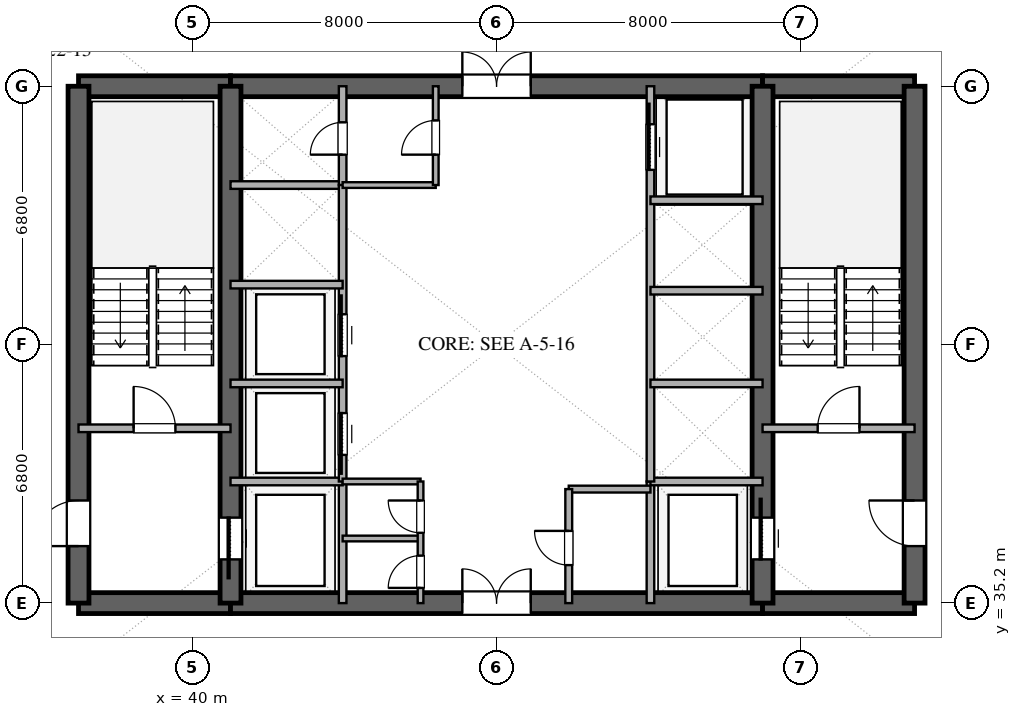
"""IFC4 building model, lengths in metres.
Left out: names, types, materials, properties, quantities, classifications, styles, units other than length and angle.
Written with IfcOpenShell. Run it as: python <this file> out.ifc"""

import sys

from ifc_helpers import new_model, si_unit, direction, frame, frame_2d, origin, place, context, subcontext, project, spatial, rectangle, extrude, element, fill, save


model = new_model("IFC4")
c1 = context("Model", 3, precision=1e-05, world=origin(), true_north=direction((0.0, 1.0)))
c2 = subcontext(c1, "Body", "Model", "MODEL_VIEW")
j1 = project(units=[si_unit("LENGTHUNIT", "METRE"), si_unit("PLANEANGLEUNIT", "RADIAN")], contexts=[c1])
p1 = place(None, origin())
s1 = spatial("IfcSite", under=j1, at=p1, CompositionType="ELEMENT")
p2 = place(p1, origin())
s2 = spatial("IfcBuilding", under=s1, at=p2, CompositionType="ELEMENT")
p3 = place(p2, frame((0.0, 0.0, 91.2)))
s3 = spatial("IfcBuildingStorey", under=s2, at=p3, CompositionType="ELEMENT", Elevation=91.2)
p4 = place(p3, frame((37.0, 35.2, 0.0), z_axis=(0.0, 0.0, 1.0), x_axis=(1.0, 0.0, 0.0)))
e1 = element("IfcWall", 1, at=p4, inside=s3, PredefinedType="SHEAR", context=c2, shape_type="SweptSolid", body=[
    extrude(rectangle(XDim=4.0, YDim=0.55, at=frame_2d((2.0, 0.0))), origin(), (0.0, 0.0, 1.0), 3.38),
])
p5 = place(p3, frame((41.0, 35.2, 0.0), z_axis=(0.0, 0.0, 1.0), x_axis=(1.0, 0.0, 0.0)))
e2 = element("IfcWall", 2, at=p5, inside=s3, PredefinedType="SHEAR", context=c2, shape_type="SweptSolid", body=[
    extrude(rectangle(XDim=14.0, YDim=0.55, at=frame_2d((7.0, 0.0))), origin(), (0.0, 0.0, 1.0), 3.38),
])
p6 = place(p5, frame((6.1, 0.0, 0.0)))
e3 = element("IfcOpeningElement", 3, at=p6, cuts=e2, PredefinedType="OPENING", context=c2, shape_type="SweptSolid", body=[
    extrude(rectangle(XDim=1.8, YDim=2.25, at=frame_2d((0.9, 1.125))), frame((0.0, 0.285, 0.0), z_axis=(0.0, -1.0, 0.0), x_axis=(1.0, 0.0, 0.0)), (0.0, 0.0, 1.0), 0.57),
])
for number, where, z_axis, x_axis in (
    (4, (55.0, 35.2, 0.0), (0.0, 0.0, 1.0), (1.0, 0.0, 0.0)),
    (5, (37.0, 48.8, 0.0), (0.0, 0.0, 1.0), (1.0, 0.0, 0.0)),
):
    element("IfcWall", number, at=place(p3, frame(where, z_axis=z_axis, x_axis=x_axis)), inside=s3, PredefinedType="SHEAR", context=c2, shape_type="SweptSolid", body=[
        extrude(rectangle(XDim=4.0, YDim=0.55, at=frame_2d((2.0, 0.0))), origin(), (0.0, 0.0, 1.0), 3.38),
    ])
p7 = place(p3, frame((41.0, 48.8, 0.0), z_axis=(0.0, 0.0, 1.0), x_axis=(1.0, 0.0, 0.0)))
e6 = element("IfcWall", 6, at=p7, inside=s3, PredefinedType="SHEAR", context=c2, shape_type="SweptSolid", body=[
    extrude(rectangle(XDim=14.0, YDim=0.55, at=frame_2d((7.0, 0.0))), origin(), (0.0, 0.0, 1.0), 3.38),
])
p8 = place(p7, frame((6.1, 0.0, 0.0)))
e7 = element("IfcOpeningElement", 7, at=p8, cuts=e6, PredefinedType="OPENING", context=c2, shape_type="SweptSolid", body=[
    extrude(rectangle(XDim=1.8, YDim=2.25, at=frame_2d((0.9, 1.125))), frame((0.0, 0.285, 0.0), z_axis=(0.0, -1.0, 0.0), x_axis=(1.0, 0.0, 0.0)), (0.0, 0.0, 1.0), 0.57),
])
p9 = place(p3, frame((55.0, 48.8, 0.0), z_axis=(0.0, 0.0, 1.0), x_axis=(1.0, 0.0, 0.0)))
e8 = element("IfcWall", 8, at=p9, inside=s3, PredefinedType="SHEAR", context=c2, shape_type="SweptSolid", body=[
    extrude(rectangle(XDim=4.0, YDim=0.55, at=frame_2d((2.0, 0.0))), origin(), (0.0, 0.0, 1.0), 3.38),
])
p10 = place(p3, frame((37.0, 35.2, 0.0), z_axis=(0.0, 0.0, 1.0), x_axis=(0.0, 1.0, 0.0)))
e9 = element("IfcWall", 9, at=p10, inside=s3, PredefinedType="SHEAR", context=c2, shape_type="SweptSolid", body=[
    extrude(rectangle(XDim=13.6, YDim=0.55, at=frame_2d((6.8, 0.0))), origin(), (0.0, 0.0, 1.0), 3.38),
])
p11 = place(p10, frame((1.5, 0.0, 0.0)))
e10 = element("IfcOpeningElement", 10, at=p11, cuts=e9, PredefinedType="OPENING", context=c2, shape_type="SweptSolid", body=[
    extrude(rectangle(XDim=1.2, YDim=2.15, at=frame_2d((0.6, 1.075))), frame((0.0, 0.285, 0.0), z_axis=(0.0, -1.0, 0.0), x_axis=(1.0, 0.0, 0.0)), (0.0, 0.0, 1.0), 0.57),
])
p12 = place(p3, frame((59.0, 35.2, 0.0), z_axis=(0.0, 0.0, 1.0), x_axis=(0.0, 1.0, 0.0)))
e11 = element("IfcWall", 11, at=p12, inside=s3, PredefinedType="SHEAR", context=c2, shape_type="SweptSolid", body=[
    extrude(rectangle(XDim=13.6, YDim=0.55, at=frame_2d((6.8, 0.0))), origin(), (0.0, 0.0, 1.0), 3.38),
])
p13 = place(p12, frame((1.5, 0.0, 0.0)))
e12 = element("IfcOpeningElement", 12, at=p13, cuts=e11, PredefinedType="OPENING", context=c2, shape_type="SweptSolid", body=[
    extrude(rectangle(XDim=1.2, YDim=2.15, at=frame_2d((0.6, 1.075))), frame((0.0, 0.285, 0.0), z_axis=(0.0, -1.0, 0.0), x_axis=(1.0, 0.0, 0.0)), (0.0, 0.0, 1.0), 0.57),
])
p14 = place(p3, frame((41.0, 35.2, 0.0), z_axis=(0.0, 0.0, 1.0), x_axis=(0.0, 1.0, 0.0)))
e13 = element("IfcWall", 13, at=p14, inside=s3, PredefinedType="SHEAR", context=c2, shape_type="SweptSolid", body=[
    extrude(rectangle(XDim=13.6, YDim=0.55, at=frame_2d((6.8, 0.0))), origin(), (0.0, 0.0, 1.0), 3.38),
])
p15 = place(p14, frame((1.15, 0.0, 0.0)))
e14 = element("IfcOpeningElement", 14, at=p15, cuts=e13, PredefinedType="OPENING", context=c2, shape_type="SweptSolid", body=[
    extrude(rectangle(XDim=1.1, YDim=2.2, at=frame_2d((0.55, 1.1))), frame((0.0, 0.285, 0.0), z_axis=(0.0, -1.0, 0.0), x_axis=(1.0, 0.0, 0.0)), (0.0, 0.0, 1.0), 0.57),
])
p16 = place(p3, frame((55.0, 35.2, 0.0), z_axis=(0.0, 0.0, 1.0), x_axis=(0.0, 1.0, 0.0)))
e15 = element("IfcWall", 15, at=p16, inside=s3, PredefinedType="SHEAR", context=c2, shape_type="SweptSolid", body=[
    extrude(rectangle(XDim=13.6, YDim=0.55, at=frame_2d((6.8, 0.0))), origin(), (0.0, 0.0, 1.0), 3.38),
])
p17 = place(p16, frame((1.15, 0.0, 0.0)))
e16 = element("IfcOpeningElement", 16, at=p17, cuts=e15, PredefinedType="OPENING", context=c2, shape_type="SweptSolid", body=[
    extrude(rectangle(XDim=1.1, YDim=2.2, at=frame_2d((0.55, 1.1))), frame((0.0, 0.285, 0.0), z_axis=(0.0, -1.0, 0.0), x_axis=(1.0, 0.0, 0.0)), (0.0, 0.0, 1.0), 0.57),
])
p18 = place(p3, frame((37.0, 39.8, 0.0), z_axis=(0.0, 0.0, 1.0), x_axis=(1.0, 0.0, 0.0)))
e17 = element("IfcWall", 17, at=p18, inside=s3, PredefinedType="SOLIDWALL", context=c2, shape_type="SweptSolid", body=[
    extrude(rectangle(XDim=4.0, YDim=0.2, at=frame_2d((2.0, 0.0))), origin(), (0.0, 0.0, 1.0), 2.74),
])
p19 = place(p18, frame((1.45, 0.0, 0.0)))
e18 = element("IfcOpeningElement", 18, at=p19, cuts=e17, PredefinedType="OPENING", context=c2, shape_type="SweptSolid", body=[
    extrude(rectangle(XDim=1.1, YDim=2.15, at=frame_2d((0.55, 1.075))), frame((0.0, 0.11, 0.0), z_axis=(0.0, -1.0, 0.0), x_axis=(1.0, 0.0, 0.0)), (0.0, 0.0, 1.0), 0.22),
])
p20 = place(p3, frame((55.0, 39.8, 0.0), z_axis=(0.0, 0.0, 1.0), x_axis=(1.0, 0.0, 0.0)))
e19 = element("IfcWall", 19, at=p20, inside=s3, PredefinedType="SOLIDWALL", context=c2, shape_type="SweptSolid", body=[
    extrude(rectangle(XDim=4.0, YDim=0.2, at=frame_2d((2.0, 0.0))), origin(), (0.0, 0.0, 1.0), 2.74),
])
p21 = place(p20, frame((1.45, 0.0, 0.0)))
e20 = element("IfcOpeningElement", 20, at=p21, cuts=e19, PredefinedType="OPENING", context=c2, shape_type="SweptSolid", body=[
    extrude(rectangle(XDim=1.1, YDim=2.15, at=frame_2d((0.55, 1.075))), frame((0.0, 0.11, 0.0), z_axis=(0.0, -1.0, 0.0), x_axis=(1.0, 0.0, 0.0)), (0.0, 0.0, 1.0), 0.22),
])
p22 = place(p3, frame((43.95, 35.2, 0.0), z_axis=(0.0, 0.0, 1.0), x_axis=(0.0, 1.0, 0.0)))
e21 = element("IfcWall", 21, at=p22, inside=s3, PredefinedType="SOLIDWALL", context=c2, shape_type="SweptSolid", body=[
    extrude(rectangle(XDim=3.2, YDim=0.2, at=frame_2d((1.6, 0.0))), origin(), (0.0, 0.0, 1.0), 2.74),
])
p23 = place(p3, frame((41.0, 38.4, 0.0), z_axis=(0.0, 0.0, 1.0), x_axis=(1.0, 0.0, 0.0)))
e22 = element("IfcWall", 22, at=p23, inside=s3, PredefinedType="SOLIDWALL", context=c2, shape_type="SweptSolid", body=[
    extrude(rectangle(XDim=2.95, YDim=0.2, at=frame_2d((1.475, 0.0))), origin(), (0.0, 0.0, 1.0), 2.74),
])
p24 = place(p3, frame((52.05, 35.2, 0.0), z_axis=(0.0, 0.0, 1.0), x_axis=(0.0, 1.0, 0.0)))
e23 = element("IfcWall", 23, at=p24, inside=s3, PredefinedType="SOLIDWALL", context=c2, shape_type="SweptSolid", body=[
    extrude(rectangle(XDim=3.2, YDim=0.2, at=frame_2d((1.6, 0.0))), origin(), (0.0, 0.0, 1.0), 2.74),
])
for number, where, z_axis, x_axis in (
    (24, (52.05, 38.4, 0.0), (0.0, 0.0, 1.0), (1.0, 0.0, 0.0)),
    (25, (41.0, 46.2, 0.0), (0.0, 0.0, 1.0), (1.0, 0.0, 0.0)),
):
    element("IfcWall", number, at=place(p3, frame(where, z_axis=z_axis, x_axis=x_axis)), inside=s3, PredefinedType="SOLIDWALL", context=c2, shape_type="SweptSolid", body=[
        extrude(rectangle(XDim=2.95, YDim=0.2, at=frame_2d((1.475, 0.0))), origin(), (0.0, 0.0, 1.0), 2.74),
    ])
p25 = place(p3, frame((43.95, 46.2, 0.0), z_axis=(0.0, 0.0, 1.0), x_axis=(0.0, 1.0, 0.0)))
e26 = element("IfcWall", 26, at=p25, inside=s3, PredefinedType="SOLIDWALL", context=c2, shape_type="SweptSolid", body=[
    extrude(rectangle(XDim=2.6, YDim=0.2, at=frame_2d((1.3, 0.0))), origin(), (0.0, 0.0, 1.0), 2.74),
])
p26 = place(p25, frame((0.8, 0.0, 0.0)))
e27 = element("IfcOpeningElement", 27, at=p26, cuts=e26, PredefinedType="OPENING", context=c2, shape_type="SweptSolid", body=[
    extrude(rectangle(XDim=0.85, YDim=2.15, at=frame_2d((0.425, 1.075))), frame((0.0, 0.11, 0.0), z_axis=(0.0, -1.0, 0.0), x_axis=(1.0, 0.0, 0.0)), (0.0, 0.0, 1.0), 0.22),
])
p27 = place(p3, frame((43.95, 38.4, 0.0), z_axis=(0.0, 0.0, 1.0), x_axis=(0.0, 1.0, 0.0)))
e28 = element("IfcWall", 28, at=p27, inside=s3, PredefinedType="SOLIDWALL", context=c2, shape_type="SweptSolid", body=[
    extrude(rectangle(XDim=7.8, YDim=0.2, at=frame_2d((3.9, 0.0))), origin(), (0.0, 0.0, 1.0), 2.74),
])
p28 = place(p27, frame((0.7, 0.0, 0.0)))
e29 = element("IfcOpeningElement", 29, at=p28, cuts=e28, PredefinedType="OPENING", context=c2, shape_type="SweptSolid", body=[
    extrude(rectangle(XDim=1.1, YDim=2.2, at=frame_2d((0.55, 1.1))), frame((0.0, 0.11, 0.0), z_axis=(0.0, -1.0, 0.0), x_axis=(1.0, 0.0, 0.0)), (0.0, 0.0, 1.0), 0.22),
])
p29 = place(p27, frame((3.3, 0.0, 0.0)))
e30 = element("IfcOpeningElement", 30, at=p29, cuts=e28, PredefinedType="OPENING", context=c2, shape_type="SweptSolid", body=[
    extrude(rectangle(XDim=1.1, YDim=2.2, at=frame_2d((0.55, 1.1))), frame((0.0, 0.11, 0.0), z_axis=(0.0, -1.0, 0.0), x_axis=(1.0, 0.0, 0.0)), (0.0, 0.0, 1.0), 0.22),
])
for number, where, z_axis, x_axis in (
    (31, (41.0, 40.98, 0.0), (0.0, 0.0, 1.0), (1.0, 0.0, 0.0)),
    (32, (41.0, 43.58, 0.0), (0.0, 0.0, 1.0), (1.0, 0.0, 0.0)),
):
    element("IfcWall", number, at=place(p3, frame(where, z_axis=z_axis, x_axis=x_axis)), inside=s3, PredefinedType="SOLIDWALL", context=c2, shape_type="SweptSolid", body=[
        extrude(rectangle(XDim=2.95, YDim=0.2, at=frame_2d((1.475, 0.0))), origin(), (0.0, 0.0, 1.0), 2.74),
    ])
p30 = place(p3, frame((52.05, 38.4, 0.0), z_axis=(0.0, 0.0, 1.0), x_axis=(0.0, 1.0, 0.0)))
e33 = element("IfcWall", 33, at=p30, inside=s3, PredefinedType="SOLIDWALL", context=c2, shape_type="SweptSolid", body=[
    extrude(rectangle(XDim=10.4, YDim=0.2, at=frame_2d((5.2, 0.0))), origin(), (0.0, 0.0, 1.0), 2.74),
])
p31 = place(p30, frame((8.2, 0.0, 0.0)))
e34 = element("IfcOpeningElement", 34, at=p31, cuts=e33, PredefinedType="OPENING", context=c2, shape_type="SweptSolid", body=[
    extrude(rectangle(XDim=1.2, YDim=2.2, at=frame_2d((0.6, 1.1))), frame((0.0, 0.11, 0.0), z_axis=(0.0, -1.0, 0.0), x_axis=(1.0, 0.0, 0.0)), (0.0, 0.0, 1.0), 0.22),
])
for number, where, z_axis, x_axis in (
    (35, (52.05, 40.98, 0.0), (0.0, 0.0, 1.0), (1.0, 0.0, 0.0)),
    (36, (52.05, 43.42, 0.0), (0.0, 0.0, 1.0), (1.0, 0.0, 0.0)),
    (37, (52.05, 45.8, 0.0), (0.0, 0.0, 1.0), (1.0, 0.0, 0.0)),
):
    element("IfcWall", number, at=place(p3, frame(where, z_axis=z_axis, x_axis=x_axis)), inside=s3, PredefinedType="SOLIDWALL", context=c2, shape_type="SweptSolid", body=[
        extrude(rectangle(XDim=2.95, YDim=0.2, at=frame_2d((1.475, 0.0))), origin(), (0.0, 0.0, 1.0), 2.74),
    ])
for number, where, z_axis, x_axis in (
    (38, (43.95, 36.9, 0.0), (0.0, 0.0, 1.0), (1.0, 0.0, 0.0)),
    (39, (43.95, 38.4, 0.0), (0.0, 0.0, 1.0), (1.0, 0.0, 0.0)),
):
    element("IfcWall", number, at=place(p3, frame(where, z_axis=z_axis, x_axis=x_axis)), inside=s3, PredefinedType="PARTITIONING", context=c2, shape_type="SweptSolid", body=[
        extrude(rectangle(XDim=2.05, YDim=0.15, at=frame_2d((1.025, 0.0))), origin(), (0.0, 0.0, 1.0), 2.74),
    ])
p32 = place(p3, frame((46.0, 35.2, 0.0), z_axis=(0.0, 0.0, 1.0), x_axis=(0.0, 1.0, 0.0)))
e40 = element("IfcWall", 40, at=p32, inside=s3, PredefinedType="PARTITIONING", context=c2, shape_type="SweptSolid", body=[
    extrude(rectangle(XDim=3.2, YDim=0.15, at=frame_2d((1.6, 0.0))), origin(), (0.0, 0.0, 1.0), 2.74),
])
p33 = place(p32, frame((0.4, 0.0, 0.0)))
e41 = element("IfcOpeningElement", 41, at=p33, cuts=e40, PredefinedType="OPENING", context=c2, shape_type="SweptSolid", body=[
    extrude(rectangle(XDim=0.85, YDim=2.15, at=frame_2d((0.425, 1.075))), frame((0.0, 0.085, 0.0), z_axis=(0.0, -1.0, 0.0), x_axis=(1.0, 0.0, 0.0)), (0.0, 0.0, 1.0), 0.17),
])
p34 = place(p32, frame((1.85, 0.0, 0.0)))
e42 = element("IfcOpeningElement", 42, at=p34, cuts=e40, PredefinedType="OPENING", context=c2, shape_type="SweptSolid", body=[
    extrude(rectangle(XDim=0.85, YDim=2.15, at=frame_2d((0.425, 1.075))), frame((0.0, 0.085, 0.0), z_axis=(0.0, -1.0, 0.0), x_axis=(1.0, 0.0, 0.0)), (0.0, 0.0, 1.0), 0.17),
])
p35 = place(p3, frame((43.95, 46.2, 0.0), z_axis=(0.0, 0.0, 1.0), x_axis=(1.0, 0.0, 0.0)))
e43 = element("IfcWall", 43, at=p35, inside=s3, PredefinedType="PARTITIONING", context=c2, shape_type="SweptSolid", body=[
    extrude(rectangle(XDim=2.45, YDim=0.15, at=frame_2d((1.225, 0.0))), origin(), (0.0, 0.0, 1.0), 2.74),
])
p36 = place(p3, frame((46.4, 46.2, 0.0), z_axis=(0.0, 0.0, 1.0), x_axis=(0.0, 1.0, 0.0)))
e44 = element("IfcWall", 44, at=p36, inside=s3, PredefinedType="PARTITIONING", context=c2, shape_type="SweptSolid", body=[
    extrude(rectangle(XDim=2.6, YDim=0.15, at=frame_2d((1.3, 0.0))), origin(), (0.0, 0.0, 1.0), 2.74),
])
p37 = place(p36, frame((0.8, 0.0, 0.0)))
e45 = element("IfcOpeningElement", 45, at=p37, cuts=e44, PredefinedType="OPENING", context=c2, shape_type="SweptSolid", body=[
    extrude(rectangle(XDim=0.9, YDim=2.15, at=frame_2d((0.45, 1.075))), frame((0.0, 0.085, 0.0), z_axis=(0.0, -1.0, 0.0), x_axis=(1.0, 0.0, 0.0)), (0.0, 0.0, 1.0), 0.17),
])
p38 = place(p3, frame((49.9, 38.2, 0.0), z_axis=(0.0, 0.0, 1.0), x_axis=(1.0, 0.0, 0.0)))
e46 = element("IfcWall", 46, at=p38, inside=s3, PredefinedType="PLUMBINGWALL", context=c2, shape_type="SweptSolid", body=[
    extrude(rectangle(XDim=2.15, YDim=0.18, at=frame_2d((1.075, 0.0))), origin(), (0.0, 0.0, 1.0), 2.74),
])
p39 = place(p3, frame((49.9, 35.2, 0.0), z_axis=(0.0, 0.0, 1.0), x_axis=(0.0, 1.0, 0.0)))
e47 = element("IfcWall", 47, at=p39, inside=s3, PredefinedType="PLUMBINGWALL", context=c2, shape_type="SweptSolid", body=[
    extrude(rectangle(XDim=3.0, YDim=0.18, at=frame_2d((1.5, 0.0))), origin(), (0.0, 0.0, 1.0), 2.74),
])
p40 = place(p39, frame((1.0, 0.0, 0.0)))
e48 = element("IfcOpeningElement", 48, at=p40, cuts=e47, PredefinedType="OPENING", context=c2, shape_type="SweptSolid", body=[
    extrude(rectangle(XDim=0.9, YDim=2.1, at=frame_2d((0.45, 1.05))), frame((0.0, 0.1, 0.0), z_axis=(0.0, -1.0, 0.0), x_axis=(1.0, 0.0, 0.0)), (0.0, 0.0, 1.0), 0.2),
])
p41 = place(p15, origin())
e49 = element("IfcDoor", 49, at=p41, inside=s3, OperationType="SLIDING_TO_LEFT", PredefinedType="DOOR", context=c2, shape_type="SweptSolid", body=[
    extrude(rectangle(XDim=1.1, YDim=2.2, at=frame_2d((0.55, 1.1))), frame((0.0, 0.025, 0.0), z_axis=(0.0, -1.0, 0.0), x_axis=(1.0, 0.0, 0.0)), (0.0, 0.0, 1.0), 0.05),
])
fill(e14, e49)
p42 = place(p17, origin())
e50 = element("IfcDoor", 50, at=p42, inside=s3, OperationType="SLIDING_TO_RIGHT", PredefinedType="DOOR", context=c2, shape_type="SweptSolid", body=[
    extrude(rectangle(XDim=1.1, YDim=2.2, at=frame_2d((0.55, 1.1))), frame((0.0, 0.025, 0.0), z_axis=(0.0, -1.0, 0.0), x_axis=(1.0, 0.0, 0.0)), (0.0, 0.0, 1.0), 0.05),
])
fill(e16, e50)
p43 = place(p11, origin())
e51 = element("IfcDoor", 51, at=p43, inside=s3, OperationType="SINGLE_SWING_LEFT", PredefinedType="DOOR", context=c2, shape_type="SweptSolid", body=[
    extrude(rectangle(XDim=1.2, YDim=2.15, at=frame_2d((0.6, 1.075))), frame((0.0, 0.025, 0.0), z_axis=(0.0, -1.0, 0.0), x_axis=(1.0, 0.0, 0.0)), (0.0, 0.0, 1.0), 0.05),
])
fill(e10, e51)
p44 = place(p13, origin())
e52 = element("IfcDoor", 52, at=p44, inside=s3, OperationType="SINGLE_SWING_RIGHT", PredefinedType="DOOR", context=c2, shape_type="SweptSolid", body=[
    extrude(rectangle(XDim=1.2, YDim=2.15, at=frame_2d((0.6, 1.075))), frame((0.0, 0.025, 0.0), z_axis=(0.0, -1.0, 0.0), x_axis=(1.0, 0.0, 0.0)), (0.0, 0.0, 1.0), 0.05),
])
fill(e12, e52)
p45 = place(p6, origin())
e53 = element("IfcDoor", 53, at=p45, inside=s3, OperationType="DOUBLE_DOOR_SINGLE_SWING", PredefinedType="DOOR", context=c2, shape_type="SweptSolid", body=[
    extrude(rectangle(XDim=1.8, YDim=2.25, at=frame_2d((0.9, 1.125))), frame((0.0, 0.025, 0.0), z_axis=(0.0, -1.0, 0.0), x_axis=(1.0, 0.0, 0.0)), (0.0, 0.0, 1.0), 0.05),
])
fill(e3, e53)
p46 = place(p8, origin())
e54 = element("IfcDoor", 54, at=p46, inside=s3, OperationType="DOUBLE_DOOR_SINGLE_SWING", PredefinedType="DOOR", context=c2, shape_type="SweptSolid", body=[
    extrude(rectangle(XDim=1.8, YDim=2.25, at=frame_2d((0.9, 1.125))), frame((0.0, 0.025, 0.0), z_axis=(0.0, -1.0, 0.0), x_axis=(1.0, 0.0, 0.0)), (0.0, 0.0, 1.0), 0.05),
])
fill(e7, e54)
p47 = place(p19, origin())
e55 = element("IfcDoor", 55, at=p47, inside=s3, OperationType="SINGLE_SWING_LEFT", PredefinedType="DOOR", context=c2, shape_type="SweptSolid", body=[
    extrude(rectangle(XDim=1.1, YDim=2.15, at=frame_2d((0.55, 1.075))), frame((0.0, 0.025, 0.0), z_axis=(0.0, -1.0, 0.0), x_axis=(1.0, 0.0, 0.0)), (0.0, 0.0, 1.0), 0.05),
])
fill(e18, e55)
p48 = place(p21, origin())
e56 = element("IfcDoor", 56, at=p48, inside=s3, OperationType="SINGLE_SWING_RIGHT", PredefinedType="DOOR", context=c2, shape_type="SweptSolid", body=[
    extrude(rectangle(XDim=1.1, YDim=2.15, at=frame_2d((0.55, 1.075))), frame((0.0, 0.025, 0.0), z_axis=(0.0, -1.0, 0.0), x_axis=(1.0, 0.0, 0.0)), (0.0, 0.0, 1.0), 0.05),
])
fill(e20, e56)
p49 = place(p26, origin())
e57 = element("IfcDoor", 57, at=p49, inside=s3, OperationType="SINGLE_SWING_LEFT", PredefinedType="DOOR", context=c2, shape_type="SweptSolid", body=[
    extrude(rectangle(XDim=0.85, YDim=2.15, at=frame_2d((0.425, 1.075))), frame((0.0, 0.025, 0.0), z_axis=(0.0, -1.0, 0.0), x_axis=(1.0, 0.0, 0.0)), (0.0, 0.0, 1.0), 0.05),
])
fill(e27, e57)
p50 = place(p28, origin())
e58 = element("IfcDoor", 58, at=p50, inside=s3, OperationType="SLIDING_TO_LEFT", PredefinedType="DOOR", context=c2, shape_type="SweptSolid", body=[
    extrude(rectangle(XDim=1.1, YDim=2.2, at=frame_2d((0.55, 1.1))), frame((0.0, 0.025, 0.0), z_axis=(0.0, -1.0, 0.0), x_axis=(1.0, 0.0, 0.0)), (0.0, 0.0, 1.0), 0.05),
])
fill(e29, e58)
p51 = place(p29, origin())
e59 = element("IfcDoor", 59, at=p51, inside=s3, OperationType="SLIDING_TO_RIGHT", PredefinedType="DOOR", context=c2, shape_type="SweptSolid", body=[
    extrude(rectangle(XDim=1.1, YDim=2.2, at=frame_2d((0.55, 1.1))), frame((0.0, 0.025, 0.0), z_axis=(0.0, -1.0, 0.0), x_axis=(1.0, 0.0, 0.0)), (0.0, 0.0, 1.0), 0.05),
])
fill(e30, e59)
p52 = place(p31, origin())
e60 = element("IfcDoor", 60, at=p52, inside=s3, OperationType="SLIDING_TO_RIGHT", PredefinedType="DOOR", context=c2, shape_type="SweptSolid", body=[
    extrude(rectangle(XDim=1.2, YDim=2.2, at=frame_2d((0.6, 1.1))), frame((0.0, 0.025, 0.0), z_axis=(0.0, -1.0, 0.0), x_axis=(1.0, 0.0, 0.0)), (0.0, 0.0, 1.0), 0.05),
])
fill(e34, e60)
p53 = place(p33, origin())
e61 = element("IfcDoor", 61, at=p53, inside=s3, OperationType="SINGLE_SWING_LEFT", PredefinedType="DOOR", context=c2, shape_type="SweptSolid", body=[
    extrude(rectangle(XDim=0.85, YDim=2.15, at=frame_2d((0.425, 1.075))), frame((0.0, 0.025, 0.0), z_axis=(0.0, -1.0, 0.0), x_axis=(1.0, 0.0, 0.0)), (0.0, 0.0, 1.0), 0.05),
])
fill(e41, e61)
p54 = place(p34, origin())
e62 = element("IfcDoor", 62, at=p54, inside=s3, OperationType="SINGLE_SWING_RIGHT", PredefinedType="DOOR", context=c2, shape_type="SweptSolid", body=[
    extrude(rectangle(XDim=0.85, YDim=2.15, at=frame_2d((0.425, 1.075))), frame((0.0, 0.025, 0.0), z_axis=(0.0, -1.0, 0.0), x_axis=(1.0, 0.0, 0.0)), (0.0, 0.0, 1.0), 0.05),
])
fill(e42, e62)
p55 = place(p37, origin())
e63 = element("IfcDoor", 63, at=p55, inside=s3, OperationType="SINGLE_SWING_LEFT", PredefinedType="DOOR", context=c2, shape_type="SweptSolid", body=[
    extrude(rectangle(XDim=0.9, YDim=2.15, at=frame_2d((0.45, 1.075))), frame((0.0, 0.025, 0.0), z_axis=(0.0, -1.0, 0.0), x_axis=(1.0, 0.0, 0.0)), (0.0, 0.0, 1.0), 0.05),
])
fill(e45, e63)
p56 = place(p40, origin())
e64 = element("IfcDoor", 64, at=p56, inside=s3, OperationType="SINGLE_SWING_RIGHT", PredefinedType="DOOR", context=c2, shape_type="SweptSolid", body=[
    extrude(rectangle(XDim=0.9, YDim=2.1, at=frame_2d((0.45, 1.05))), frame((0.0, 0.025, 0.0), z_axis=(0.0, -1.0, 0.0), x_axis=(1.0, 0.0, 0.0)), (0.0, 0.0, 1.0), 0.05),
])
fill(e48, e64)
save(model, sys.argv[1])
